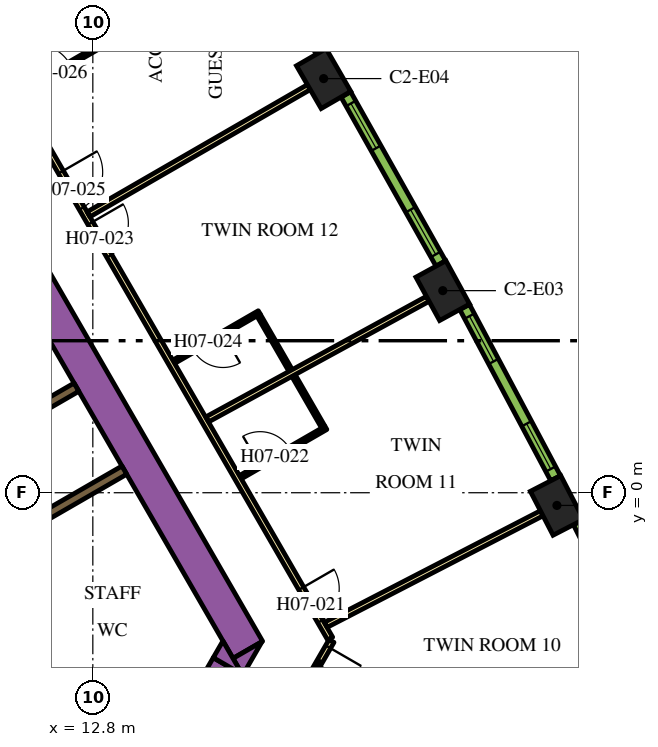
"""IFC4 building model, lengths in metres.
Left out: names, types, materials, properties, quantities, classifications, styles, units other than length and angle.
Written with IfcOpenShell. Run it as: python <this file> out.ifc"""

import sys

from ifc_helpers import new_model, si_unit, direction, frame, frame_2d, origin, origin_2d, place, context, subcontext, project, spatial, polyline, rectangle, outline, extrude, element, fill, save


model = new_model("IFC4")
c1 = context("Model", 3, precision=1e-05, world=origin(), true_north=direction((0.0, 1.0)))
c2 = subcontext(c1, "Body", "Model", "MODEL_VIEW")
j1 = project(units=[si_unit("LENGTHUNIT", "METRE"), si_unit("PLANEANGLEUNIT", "RADIAN")], contexts=[c1])
p1 = place(None, origin())
s1 = spatial("IfcSite", under=j1, at=p1, CompositionType="ELEMENT")
p2 = place(p1, origin())
s2 = spatial("IfcBuilding", under=s1, at=p2, CompositionType="ELEMENT")
p3 = place(p2, frame((0.0, 0.0, 103.2)))
s3 = spatial("IfcBuildingStorey", under=s2, at=p3, CompositionType="ELEMENT", Elevation=103.2)
for number, where, z_axis, x_axis in (
    (1, (25.012, -0.334, 0.0), (0.0, 0.0, 1.0), (-0.459, 0.888, 0.0)),
    (2, (22.009, 5.317, 0.0), (0.0, 0.0, 1.0), (-0.48, 0.877, 0.0)),
    (3, (18.874, 10.897, 0.0), (0.0, 0.0, 1.0), (-0.5, 0.866, 0.0)),
):
    element("IfcColumn", number, at=place(p3, frame(where, z_axis=z_axis, x_axis=x_axis)), inside=s3, PredefinedType="COLUMN", context=c2, shape_type="SweptSolid", body=[
        extrude(rectangle(XDim=1.3, YDim=0.9, at=origin_2d()), origin(), (0.0, 0.0, 1.0), 3.9),
    ])
p4 = place(p3, frame((6.711, 13.476, 0.0), z_axis=(0.0, 0.0, 1.0), x_axis=(0.500002723396, -0.866023831425, 0.0)))
e4 = element("IfcWall", 4, at=p4, inside=s3, PredefinedType="SOLIDWALL", context=c2, shape_type="SweptSolid", body=[
    extrude(rectangle(XDim=20.334, YDim=0.9, at=frame_2d((10.167, 0.0))), origin(), (0.0, 0.0, 1.0), 3.9),
])
p5 = place(p3, origin())
e5 = element("IfcWall", 5, at=p5, inside=s3, PredefinedType="SOLIDWALL", context=c2, shape_type="SweptSolid", body=[
    extrude(outline(polyline([(16.743, -4.8), (16.489, -4.36), (17.251, -3.92), (16.743, -4.8)])), origin(), (0.0, 0.0, 1.0), 3.9),
])
p6 = place(p3, frame((11.695, -12.644, 0.0), z_axis=(0.0, 0.0, 1.0), x_axis=(0.500010229568, 0.86601949766, 0.0)))
e6 = element("IfcWall", 6, at=p6, inside=s3, PredefinedType="SOLIDWALL", context=c2, shape_type="SweptSolid", body=[
    extrude(rectangle(XDim=9.326, YDim=0.9, at=frame_2d((4.663, 0.0))), origin(), (0.0, 0.0, 1.0), 3.9),
])
e7 = element("IfcWall", 7, at=p5, inside=s3, PredefinedType="SOLIDWALL", context=c2, shape_type="SweptSolid", body=[
    extrude(outline(polyline([(16.223, -3.9), (16.732, -4.78), (15.969, -4.34), (16.223, -3.9)])), origin(), (0.0, 0.0, 1.0), 3.9),
])
p7 = place(p3, frame((8.334, -2.964, 0.0), z_axis=(0.0, 0.0, 1.0), x_axis=(0.866016039709, -0.500016218704, 0.0)))
e8 = element("IfcWall", 8, at=p7, inside=s3, PredefinedType="SOLIDWALL", context=c2, shape_type="SweptSolid", body=[
    extrude(rectangle(XDim=7.05, YDim=0.25, at=frame_2d((3.525, 0.0))), origin(), (0.0, 0.0, 1.0), 3.9),
])
p8 = place(p3, frame((10.464, 1.677, 0.0), z_axis=(0.0, 0.0, 1.0), x_axis=(0.86605622881, 0.499946605688, 0.0)))
e9 = element("IfcWall", 9, at=p8, inside=s3, PredefinedType="SOLIDWALL", context=c2, shape_type="SweptSolid", body=[
    extrude(rectangle(XDim=2.2, YDim=0.25, at=frame_2d((1.1, 0.0))), origin(), (0.0, 0.0, 1.0), 3.9),
])
p9 = place(p3, frame((13.629, 0.594, 0.0), z_axis=(0.0, 0.0, 1.0), x_axis=(-0.86602790099, -0.499995674689, 0.0)))
e10 = element("IfcWall", 10, at=p9, inside=s3, PredefinedType="SOLIDWALL", context=c2, shape_type="SweptSolid", body=[
    extrude(rectangle(XDim=3.146, YDim=0.25, at=frame_2d((1.573, 0.0))), origin(), (0.0, 0.0, 1.0), 3.9),
])
p10 = place(p3, frame((19.081, -3.9, 0.0), z_axis=(0.0, 0.0, 1.0), x_axis=(-0.499974327079, -0.866040225545, 0.0)))
e11 = element("IfcWall", 11, at=p10, inside=s3, PredefinedType="PARTITIONING", context=c2, shape_type="SweptSolid", body=[
    extrude(rectangle(XDim=5.258, YDim=0.15, at=frame_2d((2.629, 0.0))), origin(), (0.0, 0.0, 1.0), 2.75),
])
p11 = place(p10, frame((0.18, 0.0, 0.0)))
e12 = element("IfcOpeningElement", 12, at=p11, cuts=e11, PredefinedType="OPENING", context=c2, shape_type="SweptSolid", body=[
    extrude(rectangle(XDim=1.0, YDim=2.1, at=frame_2d((0.5, 1.05))), frame((0.0, 0.085, 0.0), z_axis=(0.0, -1.0, 0.0), x_axis=(1.0, 0.0, 0.0)), (0.0, 0.0, 1.0), 0.17),
])
p12 = place(p3, frame((6.163, 18.475, 0.0), z_axis=(0.0, 0.0, 1.0), x_axis=(0.500001317485, -0.866024643133, 0.0)))
e13 = element("IfcWall", 13, at=p12, inside=s3, PredefinedType="PARTITIONING", context=c2, shape_type="SweptSolid", body=[
    extrude(rectangle(XDim=25.767, YDim=0.15, at=frame_2d((12.883, 0.0))), origin(), (0.0, 0.0, 1.0), 2.75),
])
p13 = place(p12, frame((24.241, 0.0, 0.0)))
e14 = element("IfcOpeningElement", 14, at=p13, cuts=e13, PredefinedType="OPENING", context=c2, shape_type="SweptSolid", body=[
    extrude(rectangle(XDim=1.0, YDim=2.1, at=frame_2d((0.5, 1.05))), frame((0.0, 0.085, 0.0), z_axis=(0.0, -1.0, 0.0), x_axis=(1.0, 0.0, 0.0)), (0.0, 0.0, 1.0), 0.17),
])
p14 = place(p12, frame((13.144, 0.0, 0.0)))
e15 = element("IfcOpeningElement", 15, at=p14, cuts=e13, PredefinedType="OPENING", context=c2, shape_type="SweptSolid", body=[
    extrude(rectangle(XDim=1.0, YDim=2.1, at=frame_2d((0.5, 1.05))), frame((0.0, 0.085, 0.0), z_axis=(0.0, -1.0, 0.0), x_axis=(1.0, 0.0, 0.0)), (0.0, 0.0, 1.0), 0.17),
])
p15 = place(p12, frame((11.592, 0.0, 0.0)))
e16 = element("IfcOpeningElement", 16, at=p15, cuts=e13, PredefinedType="OPENING", context=c2, shape_type="SweptSolid", body=[
    extrude(rectangle(XDim=1.1, YDim=2.1, at=frame_2d((0.55, 1.05))), frame((0.0, 0.085, 0.0), z_axis=(0.0, -1.0, 0.0), x_axis=(1.0, 0.0, 0.0)), (0.0, 0.0, 1.0), 0.17),
])
p16 = place(p12, frame((4.674, 0.0, 0.0)))
e17 = element("IfcOpeningElement", 17, at=p16, cuts=e13, PredefinedType="OPENING", context=c2, shape_type="SweptSolid", body=[
    extrude(rectangle(XDim=0.9, YDim=2.1, at=frame_2d((0.45, 1.05))), frame((0.0, 0.085, 0.0), z_axis=(0.0, -1.0, 0.0), x_axis=(1.0, 0.0, 0.0)), (0.0, 0.0, 1.0), 0.17),
])
p17 = place(p12, frame((2.411, 0.0, 0.0)))
e18 = element("IfcOpeningElement", 18, at=p17, cuts=e13, PredefinedType="OPENING", context=c2, shape_type="SweptSolid", body=[
    extrude(rectangle(XDim=1.0, YDim=2.1, at=frame_2d((0.5, 1.05))), frame((0.0, 0.085, 0.0), z_axis=(0.0, -1.0, 0.0), x_axis=(1.0, 0.0, 0.0)), (0.0, 0.0, 1.0), 0.17),
])
p18 = place(p3, frame((18.484, 10.672, 0.0), z_axis=(0.0, 0.0, 1.0), x_axis=(-0.866019162053, -0.50001081084, 0.0)))
e19 = element("IfcWall", 19, at=p18, inside=s3, PredefinedType="PARTITIONING", context=c2, shape_type="SweptSolid", body=[
    extrude(rectangle(XDim=6.694, YDim=0.15, at=frame_2d((3.347, 0.0))), origin(), (0.0, 0.0, 1.0), 2.75),
])
p19 = place(p3, frame((21.614, 5.102, 0.0), z_axis=(0.0, 0.0, 1.0), x_axis=(-0.877484555087, -0.479604895287, 0.0)))
e20 = element("IfcWall", 20, at=p19, inside=s3, PredefinedType="PARTITIONING", context=c2, shape_type="SweptSolid", body=[
    extrude(rectangle(XDim=6.611, YDim=0.15, at=frame_2d((3.306, 0.0))), origin(), (0.0, 0.0, 1.0), 2.75),
])
p20 = place(p3, frame((24.613, -0.541, 0.0), z_axis=(0.0, 0.0, 1.0), x_axis=(-0.888459912519, -0.458954228487, 0.0)))
e21 = element("IfcWall", 21, at=p20, inside=s3, PredefinedType="PARTITIONING", context=c2, shape_type="SweptSolid", body=[
    extrude(rectangle(XDim=6.392, YDim=0.15, at=frame_2d((3.196, 0.0))), origin(), (0.0, 0.0, 1.0), 2.75),
])
p21 = place(p3, frame((16.681, 0.407, 0.0), z_axis=(0.0, 0.0, 1.0), x_axis=(0.866021400173, 0.500006934395, 0.0)))
e22 = element("IfcWall", 22, at=p21, inside=s3, PredefinedType="PARTITIONING", context=c2, shape_type="SweptSolid", body=[
    extrude(rectangle(XDim=2.6, YDim=0.1, at=frame_2d((1.3, 0.0))), origin(), (0.0, 0.0, 1.0), 2.75),
])
p22 = place(p21, frame((0.6, 0.0, 0.0)))
e23 = element("IfcOpeningElement", 23, at=p22, cuts=e22, PredefinedType="OPENING", context=c2, shape_type="SweptSolid", body=[
    extrude(rectangle(XDim=0.9, YDim=2.1, at=frame_2d((0.45, 1.05))), frame((0.0, 0.06, 0.0), z_axis=(0.0, -1.0, 0.0), x_axis=(1.0, 0.0, 0.0)), (0.0, 0.0, 1.0), 0.12),
])
p23 = place(p3, frame((18.86, 1.734, 0.0), z_axis=(0.0, 0.0, 1.0), x_axis=(-0.500017819788, 0.86601511528, 0.0)))
e24 = element("IfcWall", 24, at=p23, inside=s3, PredefinedType="PARTITIONING", context=c2, shape_type="SweptSolid", body=[
    extrude(rectangle(XDim=1.55, YDim=0.1, at=frame_2d((0.775, 0.0))), origin(), (0.0, 0.0, 1.0), 2.75),
])
p24 = place(p3, frame((17.179, 4.745, 0.0), z_axis=(0.0, 0.0, 1.0), x_axis=(-0.866021400173, -0.500006934395, 0.0)))
e25 = element("IfcWall", 25, at=p24, inside=s3, PredefinedType="PARTITIONING", context=c2, shape_type="SweptSolid", body=[
    extrude(rectangle(XDim=2.6, YDim=0.1, at=frame_2d((1.3, 0.0))), origin(), (0.0, 0.0, 1.0), 2.75),
])
p25 = place(p24, frame((1.1, 0.0, 0.0)))
e26 = element("IfcOpeningElement", 26, at=p25, cuts=e25, PredefinedType="OPENING", context=c2, shape_type="SweptSolid", body=[
    extrude(rectangle(XDim=0.9, YDim=2.1, at=frame_2d((0.45, 1.05))), frame((0.0, 0.06, 0.0), z_axis=(0.0, -1.0, 0.0), x_axis=(1.0, 0.0, 0.0)), (0.0, 0.0, 1.0), 0.12),
])
p26 = place(p3, frame((17.161, 4.677, 0.0), z_axis=(0.0, 0.0, 1.0), x_axis=(0.499890179513, -0.866088799389, 0.0)))
e27 = element("IfcWall", 27, at=p26, inside=s3, PredefinedType="PARTITIONING", context=c2, shape_type="SweptSolid", body=[
    extrude(rectangle(XDim=1.68, YDim=0.1, at=frame_2d((0.84, 0.0))), origin(), (0.0, 0.0, 1.0), 2.75),
])
p27 = place(p3, frame((10.847, 10.513, 0.0), z_axis=(0.0, 0.0, 1.0), x_axis=(0.865996816683, 0.500049511043, 0.0)))
e28 = element("IfcWall", 28, at=p27, inside=s3, PredefinedType="PARTITIONING", context=c2, shape_type="SweptSolid", body=[
    extrude(rectangle(XDim=2.8, YDim=0.1, at=frame_2d((1.4, 0.0))), origin(), (0.0, 0.0, 1.0), 2.75),
])
p28 = place(p27, frame((0.55, 0.0, 0.0)))
e29 = element("IfcOpeningElement", 29, at=p28, cuts=e28, PredefinedType="OPENING", context=c2, shape_type="SweptSolid", body=[
    extrude(rectangle(XDim=1.0, YDim=2.1, at=frame_2d((0.5, 1.05))), frame((0.0, 0.06, 0.0), z_axis=(0.0, -1.0, 0.0), x_axis=(1.0, 0.0, 0.0)), (0.0, 0.0, 1.0), 0.12),
])
p29 = place(p3, frame((27.864, -5.336, 0.0), z_axis=(0.0, 0.0, 1.0), x_axis=(-0.448534297211, 0.893765620409, 0.0)))
e30 = element("IfcWall", 30, at=p29, inside=s3, PredefinedType="SOLIDWALL", context=c2, shape_type="SweptSolid", body=[
    extrude(rectangle(XDim=5.1, YDim=0.29, at=frame_2d((2.55, 0.0))), origin(), (0.0, 0.0, 1.0), 3.65),
])
p30 = place(p29, frame((0.272, 0.0, 0.9)))
e31 = element("IfcOpeningElement", 31, at=p30, cuts=e30, PredefinedType="OPENING", context=c2, shape_type="SweptSolid", body=[
    extrude(rectangle(XDim=1.35, YDim=2.15, at=frame_2d((0.675, 1.075))), frame((0.0, 0.155, 0.0), z_axis=(0.0, -1.0, 0.0), x_axis=(1.0, 0.0, 0.0)), (0.0, 0.0, 1.0), 0.31),
])
p31 = place(p29, frame((3.478, 0.0, 0.9)))
e32 = element("IfcOpeningElement", 32, at=p31, cuts=e30, PredefinedType="OPENING", context=c2, shape_type="SweptSolid", body=[
    extrude(rectangle(XDim=1.35, YDim=2.15, at=frame_2d((0.675, 1.075))), frame((0.0, 0.155, 0.0), z_axis=(0.0, -1.0, 0.0), x_axis=(1.0, 0.0, 0.0)), (0.0, 0.0, 1.0), 0.31),
])
p32 = place(p3, frame((24.977, 0.383, 0.0), z_axis=(0.0, 0.0, 1.0), x_axis=(-0.469323203119, 0.883026461106, 0.0)))
e33 = element("IfcWall", 33, at=p32, inside=s3, PredefinedType="SOLIDWALL", context=c2, shape_type="SweptSolid", body=[
    extrude(rectangle(XDim=5.101, YDim=0.29, at=frame_2d((2.55, 0.0))), origin(), (0.0, 0.0, 1.0), 3.65),
])
p33 = place(p32, frame((0.273, 0.0, 0.9)))
e34 = element("IfcOpeningElement", 34, at=p33, cuts=e33, PredefinedType="OPENING", context=c2, shape_type="SweptSolid", body=[
    extrude(rectangle(XDim=1.35, YDim=2.15, at=frame_2d((0.675, 1.075))), frame((0.0, 0.155, 0.0), z_axis=(0.0, -1.0, 0.0), x_axis=(1.0, 0.0, 0.0)), (0.0, 0.0, 1.0), 0.31),
])
p34 = place(p32, frame((3.478, 0.0, 0.9)))
e35 = element("IfcOpeningElement", 35, at=p34, cuts=e33, PredefinedType="OPENING", context=c2, shape_type="SweptSolid", body=[
    extrude(rectangle(XDim=1.35, YDim=2.15, at=frame_2d((0.675, 1.075))), frame((0.0, 0.155, 0.0), z_axis=(0.0, -1.0, 0.0), x_axis=(1.0, 0.0, 0.0)), (0.0, 0.0, 1.0), 0.31),
])
p35 = place(p3, frame((21.956, 6.033, 0.0), z_axis=(0.0, 0.0, 1.0), x_axis=(-0.48983164787, 0.87181704316, 0.0)))
e36 = element("IfcWall", 36, at=p35, inside=s3, PredefinedType="SOLIDWALL", context=c2, shape_type="SweptSolid", body=[
    extrude(rectangle(XDim=5.1, YDim=0.29, at=frame_2d((2.55, 0.0))), origin(), (0.0, 0.0, 1.0), 3.65),
])
p36 = place(p35, frame((0.273, 0.0, 0.9)))
e37 = element("IfcOpeningElement", 37, at=p36, cuts=e36, PredefinedType="OPENING", context=c2, shape_type="SweptSolid", body=[
    extrude(rectangle(XDim=1.35, YDim=2.15, at=frame_2d((0.675, 1.075))), frame((0.0, 0.155, 0.0), z_axis=(0.0, -1.0, 0.0), x_axis=(1.0, 0.0, 0.0)), (0.0, 0.0, 1.0), 0.31),
])
p37 = place(p35, frame((3.478, 0.0, 0.9)))
e38 = element("IfcOpeningElement", 38, at=p37, cuts=e36, PredefinedType="OPENING", context=c2, shape_type="SweptSolid", body=[
    extrude(rectangle(XDim=1.35, YDim=2.15, at=frame_2d((0.675, 1.075))), frame((0.0, 0.155, 0.0), z_axis=(0.0, -1.0, 0.0), x_axis=(1.0, 0.0, 0.0)), (0.0, 0.0, 1.0), 0.31),
])
p38 = place(p3, frame((18.805, 11.611, 0.0), z_axis=(0.0, 0.0, 1.0), x_axis=(-0.510054281659, 0.860142214847, 0.0)))
e39 = element("IfcWall", 39, at=p38, inside=s3, PredefinedType="SOLIDWALL", context=c2, shape_type="SweptSolid", body=[
    extrude(rectangle(XDim=5.101, YDim=0.29, at=frame_2d((2.55, 0.0))), origin(), (0.0, 0.0, 1.0), 3.65),
])
p39 = place(p38, frame((0.273, 0.0, 0.9)))
e40 = element("IfcOpeningElement", 40, at=p39, cuts=e39, PredefinedType="OPENING", context=c2, shape_type="SweptSolid", body=[
    extrude(rectangle(XDim=1.35, YDim=2.15, at=frame_2d((0.675, 1.075))), frame((0.0, 0.155, 0.0), z_axis=(0.0, -1.0, 0.0), x_axis=(1.0, 0.0, 0.0)), (0.0, 0.0, 1.0), 0.31),
])
p40 = place(p38, frame((3.478, 0.0, 0.9)))
e41 = element("IfcOpeningElement", 41, at=p40, cuts=e39, PredefinedType="OPENING", context=c2, shape_type="SweptSolid", body=[
    extrude(rectangle(XDim=1.35, YDim=2.15, at=frame_2d((0.675, 1.075))), frame((0.0, 0.155, 0.0), z_axis=(0.0, -1.0, 0.0), x_axis=(1.0, 0.0, 0.0)), (0.0, 0.0, 1.0), 0.31),
])
p41 = place(p11, origin())
e42 = element("IfcDoor", 42, at=p41, inside=s3, OperationType="SINGLE_SWING_LEFT", PredefinedType="DOOR", context=c2, shape_type="SweptSolid", body=[
    extrude(rectangle(XDim=1.0, YDim=2.1, at=frame_2d((0.5, 1.05))), frame((0.0, 0.025, 0.0), z_axis=(0.0, -1.0, 0.0), x_axis=(1.0, 0.0, 0.0)), (0.0, 0.0, 1.0), 0.05),
])
fill(e12, e42)
p42 = place(p13, origin())
e43 = element("IfcDoor", 43, at=p42, inside=s3, OperationType="SINGLE_SWING_RIGHT", PredefinedType="DOOR", context=c2, shape_type="SweptSolid", body=[
    extrude(rectangle(XDim=1.0, YDim=2.1, at=frame_2d((0.5, 1.05))), frame((0.0, 0.025, 0.0), z_axis=(0.0, -1.0, 0.0), x_axis=(1.0, 0.0, 0.0)), (0.0, 0.0, 1.0), 0.05),
])
fill(e14, e43)
p43 = place(p22, origin())
e44 = element("IfcDoor", 44, at=p43, inside=s3, OperationType="SINGLE_SWING_LEFT", PredefinedType="DOOR", context=c2, shape_type="SweptSolid", body=[
    extrude(rectangle(XDim=0.9, YDim=2.1, at=frame_2d((0.45, 1.05))), frame((0.0, 0.025, 0.0), z_axis=(0.0, -1.0, 0.0), x_axis=(1.0, 0.0, 0.0)), (0.0, 0.0, 1.0), 0.05),
])
fill(e23, e44)
p44 = place(p14, origin())
e45 = element("IfcDoor", 45, at=p44, inside=s3, OperationType="SINGLE_SWING_LEFT", PredefinedType="DOOR", context=c2, shape_type="SweptSolid", body=[
    extrude(rectangle(XDim=1.0, YDim=2.1, at=frame_2d((0.5, 1.05))), frame((0.0, 0.025, 0.0), z_axis=(0.0, -1.0, 0.0), x_axis=(1.0, 0.0, 0.0)), (0.0, 0.0, 1.0), 0.05),
])
fill(e15, e45)
p45 = place(p25, origin())
e46 = element("IfcDoor", 46, at=p45, inside=s3, OperationType="SINGLE_SWING_RIGHT", PredefinedType="DOOR", context=c2, shape_type="SweptSolid", body=[
    extrude(rectangle(XDim=0.9, YDim=2.1, at=frame_2d((0.45, 1.05))), frame((0.0, 0.025, 0.0), z_axis=(0.0, -1.0, 0.0), x_axis=(1.0, 0.0, 0.0)), (0.0, 0.0, 1.0), 0.05),
])
fill(e26, e46)
p46 = place(p15, origin())
e47 = element("IfcDoor", 47, at=p46, inside=s3, OperationType="SINGLE_SWING_RIGHT", PredefinedType="DOOR", context=c2, shape_type="SweptSolid", body=[
    extrude(rectangle(XDim=1.1, YDim=2.1, at=frame_2d((0.55, 1.05))), frame((0.0, 0.025, 0.0), z_axis=(0.0, -1.0, 0.0), x_axis=(1.0, 0.0, 0.0)), (0.0, 0.0, 1.0), 0.05),
])
fill(e16, e47)
p47 = place(p28, origin())
e48 = element("IfcDoor", 48, at=p47, inside=s3, OperationType="SINGLE_SWING_LEFT", PredefinedType="DOOR", context=c2, shape_type="SweptSolid", body=[
    extrude(rectangle(XDim=1.0, YDim=2.1, at=frame_2d((0.5, 1.05))), frame((0.0, 0.025, 0.0), z_axis=(0.0, -1.0, 0.0), x_axis=(1.0, 0.0, 0.0)), (0.0, 0.0, 1.0), 0.05),
])
fill(e29, e48)
p48 = place(p33, origin())
e49 = element("IfcWindow", 49, at=p48, inside=s3, PartitioningType="DOUBLE_PANEL_VERTICAL", PredefinedType="WINDOW", context=c2, shape_type="SweptSolid", body=[
    extrude(rectangle(XDim=1.35, YDim=2.15, at=frame_2d((0.675, 1.075))), frame((0.0, 0.015, 0.0), z_axis=(0.0, -1.0, 0.0), x_axis=(1.0, 0.0, 0.0)), (0.0, 0.0, 1.0), 0.06),
])
fill(e34, e49)
p49 = place(p34, origin())
e50 = element("IfcWindow", 50, at=p49, inside=s3, PartitioningType="DOUBLE_PANEL_VERTICAL", PredefinedType="WINDOW", context=c2, shape_type="SweptSolid", body=[
    extrude(rectangle(XDim=1.35, YDim=2.15, at=frame_2d((0.675, 1.075))), frame((0.0, 0.015, 0.0), z_axis=(0.0, -1.0, 0.0), x_axis=(1.0, 0.0, 0.0)), (0.0, 0.0, 1.0), 0.06),
])
fill(e35, e50)
p50 = place(p36, origin())
e51 = element("IfcWindow", 51, at=p50, inside=s3, PartitioningType="DOUBLE_PANEL_VERTICAL", PredefinedType="WINDOW", context=c2, shape_type="SweptSolid", body=[
    extrude(rectangle(XDim=1.35, YDim=2.15, at=frame_2d((0.675, 1.075))), frame((0.0, 0.015, 0.0), z_axis=(0.0, -1.0, 0.0), x_axis=(1.0, 0.0, 0.0)), (0.0, 0.0, 1.0), 0.06),
])
fill(e37, e51)
p51 = place(p37, origin())
e52 = element("IfcWindow", 52, at=p51, inside=s3, PartitioningType="DOUBLE_PANEL_VERTICAL", PredefinedType="WINDOW", context=c2, shape_type="SweptSolid", body=[
    extrude(rectangle(XDim=1.35, YDim=2.15, at=frame_2d((0.675, 1.075))), frame((0.0, 0.015, 0.0), z_axis=(0.0, -1.0, 0.0), x_axis=(1.0, 0.0, 0.0)), (0.0, 0.0, 1.0), 0.06),
])
fill(e38, e52)
save(model, sys.argv[1])
